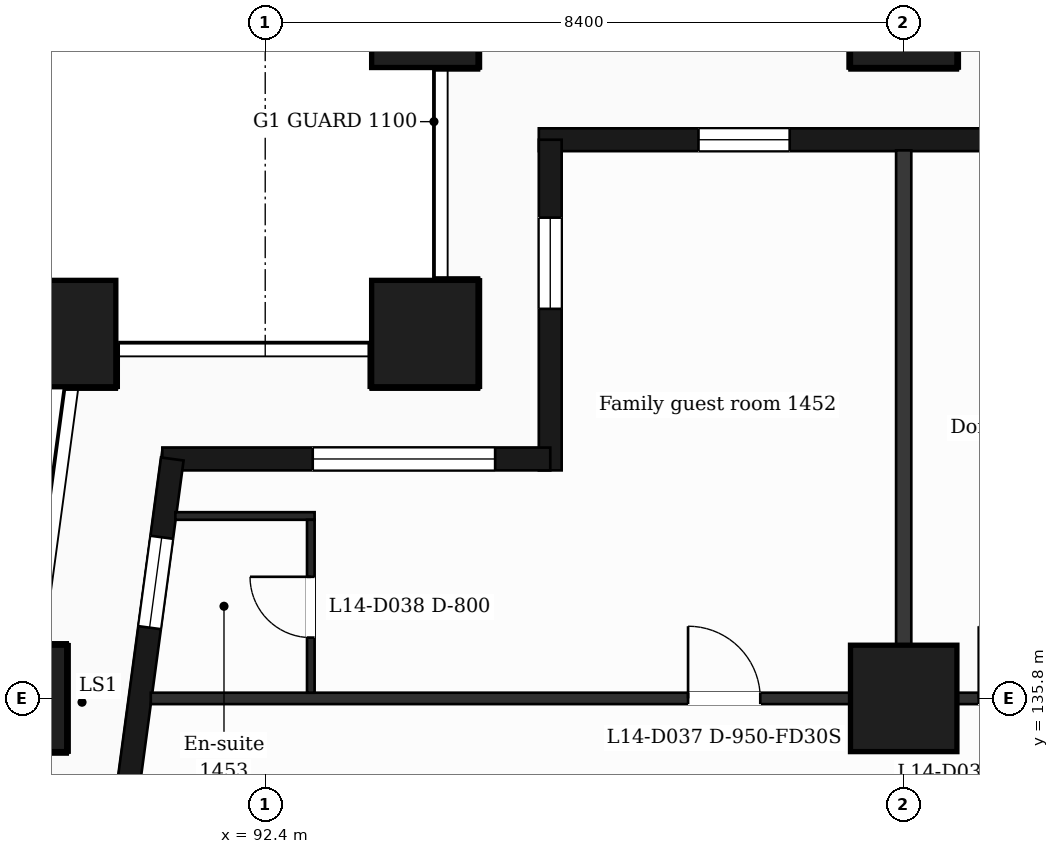
"""IFC4 building model, lengths in metres.
Left out: names, types, materials, properties, quantities, classifications, styles, units other than length and angle.
Written with IfcOpenShell. Run it as: python <this file> out.ifc"""

import sys

from ifc_helpers import new_model, si_unit, direction, frame, frame_2d, origin, origin_2d, place, context, subcontext, project, spatial, rectangle, extrude, element, fill, save


model = new_model("IFC4")
c1 = context("Model", 3, precision=1e-05, world=origin(), true_north=direction((0.0, 1.0)))
c2 = subcontext(c1, "Body", "Model", "MODEL_VIEW")
j1 = project(units=[si_unit("LENGTHUNIT", "METRE"), si_unit("PLANEANGLEUNIT", "RADIAN")], contexts=[c1])
p1 = place(None, origin())
s1 = spatial("IfcSite", under=j1, at=p1, CompositionType="ELEMENT")
p2 = place(p1, origin())
s2 = spatial("IfcBuilding", under=s1, at=p2, CompositionType="ELEMENT")
p3 = place(p2, frame((0.0, 0.0, 67.0)))
s3 = spatial("IfcBuildingStorey", under=s2, at=p3, CompositionType="ELEMENT", Elevation=67.0)
for number, where, z_axis, x_axis in (
    (1, (94.5, 140.6, 0.0), (0.0, 0.0, 1.0), (1.0, 0.0, 0.0)),
    (2, (89.735, 140.6, 0.0), (0.0, 0.0, 1.0), (1.0, 0.0, 0.0)),
    (3, (100.8, 135.8, 0.0), (0.0, 0.0, 1.0), (1.0, 0.0, 0.0)),
    (4, (89.088, 135.8, 0.0), (0.0, 0.0, 1.0), (1.0, 0.0, 0.0)),
    (5, (100.8, 144.8, 0.0), (0.0, 0.0, 1.0), (1.0, 0.0, 0.0)),
    (6, (94.5, 144.8, 0.0), (0.0, 0.0, 1.0), (1.0, 0.0, 0.0)),
):
    element("IfcColumn", number, at=place(p3, frame(where, z_axis=z_axis, x_axis=x_axis)), inside=s3, PredefinedType="COLUMN", context=c2, shape_type="SweptSolid", body=[
        extrude(rectangle(XDim=1.4, YDim=1.4, at=origin_2d()), origin(), (0.0, 0.0, 1.0), 3.5),
    ])
p4 = place(p3, frame((110.4, 143.15, 0.0), z_axis=(0.0, 0.0, 1.0), x_axis=(-1.0, 0.0, 0.0)))
e7 = element("IfcWall", 7, at=p4, inside=s3, PredefinedType="SOLIDWALL", context=c2, shape_type="SweptSolid", body=[
    extrude(rectangle(XDim=14.4, YDim=0.3, at=frame_2d((7.2, 0.0))), origin(), (0.0, 0.0, 1.0), 3.18),
])
p5 = place(p4, frame((2.1, 0.0, 0.9)))
e8 = element("IfcOpeningElement", 8, at=p5, cuts=e7, PredefinedType="OPENING", context=c2, shape_type="SweptSolid", body=[
    extrude(rectangle(XDim=2.4, YDim=2.1, at=frame_2d((1.2, 1.05))), frame((0.0, 0.16, 0.0), z_axis=(0.0, -1.0, 0.0), x_axis=(1.0, 0.0, 0.0)), (0.0, 0.0, 1.0), 0.32),
])
p6 = place(p4, frame((6.9, 0.0, 0.0)))
e9 = element("IfcOpeningElement", 9, at=p6, cuts=e7, PredefinedType="OPENING", context=c2, shape_type="SweptSolid", body=[
    extrude(rectangle(XDim=1.2, YDim=2.4, at=frame_2d((0.6, 1.2))), frame((0.0, 0.16, 0.0), z_axis=(0.0, -1.0, 0.0), x_axis=(1.0, 0.0, 0.0)), (0.0, 0.0, 1.0), 0.32),
])
p7 = place(p4, frame((11.1, 0.0, 0.9)))
e10 = element("IfcOpeningElement", 10, at=p7, cuts=e7, PredefinedType="OPENING", context=c2, shape_type="SweptSolid", body=[
    extrude(rectangle(XDim=1.2, YDim=2.1, at=frame_2d((0.6, 1.05))), frame((0.0, 0.16, 0.0), z_axis=(0.0, -1.0, 0.0), x_axis=(1.0, 0.0, 0.0)), (0.0, 0.0, 1.0), 0.32),
])
p8 = place(p3, frame((96.15, 143.15, 0.0), z_axis=(0.0, 0.0, 1.0), x_axis=(0.0, -1.0, 0.0)))
e11 = element("IfcWall", 11, at=p8, inside=s3, PredefinedType="SOLIDWALL", context=c2, shape_type="SweptSolid", body=[
    extrude(rectangle(XDim=4.35, YDim=0.3, at=frame_2d((2.175, 0.0))), origin(), (0.0, 0.0, 1.0), 3.18),
])
p9 = place(p8, frame((1.025, 0.0, 0.9)))
e12 = element("IfcOpeningElement", 12, at=p9, cuts=e11, PredefinedType="OPENING", context=c2, shape_type="SweptSolid", body=[
    extrude(rectangle(XDim=1.2, YDim=2.1, at=frame_2d((0.6, 1.05))), frame((0.0, 0.16, 0.0), z_axis=(0.0, -1.0, 0.0), x_axis=(1.0, 0.0, 0.0)), (0.0, 0.0, 1.0), 0.32),
])
p10 = place(p3, frame((96.15, 138.95, 0.0), z_axis=(0.0, 0.0, 1.0), x_axis=(-1.0, 0.0, 0.0)))
e13 = element("IfcWall", 13, at=p10, inside=s3, PredefinedType="SOLIDWALL", context=c2, shape_type="SweptSolid", body=[
    extrude(rectangle(XDim=5.104, YDim=0.3, at=frame_2d((2.552, 0.0))), origin(), (0.0, 0.0, 1.0), 3.18),
])
p11 = place(p10, frame((0.725, 0.0, 0.9)))
e14 = element("IfcOpeningElement", 14, at=p11, cuts=e13, PredefinedType="OPENING", context=c2, shape_type="SweptSolid", body=[
    extrude(rectangle(XDim=2.4, YDim=2.1, at=frame_2d((1.2, 1.05))), frame((0.0, 0.16, 0.0), z_axis=(0.0, -1.0, 0.0), x_axis=(1.0, 0.0, 0.0)), (0.0, 0.0, 1.0), 0.32),
])
p12 = place(p3, frame((91.177, 138.95, 0.0), z_axis=(0.0, 0.0, 1.0), x_axis=(-0.133426664613, -0.991058689065, 0.0)))
e15 = element("IfcWall", 15, at=p12, inside=s3, PredefinedType="SOLIDWALL", context=c2, shape_type="SweptSolid", body=[
    extrude(rectangle(XDim=6.609, YDim=0.3, at=frame_2d((3.305, 0.0))), origin(), (0.0, 0.0, 1.0), 3.18),
])
p13 = place(p12, frame((1.039, 0.0, 0.9)))
e16 = element("IfcOpeningElement", 16, at=p13, cuts=e15, PredefinedType="OPENING", context=c2, shape_type="SweptSolid", body=[
    extrude(rectangle(XDim=1.2, YDim=2.1, at=frame_2d((0.6, 1.05))), frame((0.0, 0.16, 0.0), z_axis=(0.0, -1.0, 0.0), x_axis=(1.0, 0.0, 0.0)), (0.0, 0.0, 1.0), 0.32),
])
p14 = place(p12, frame((4.294, 0.0, 0.0)))
e17 = element("IfcOpeningElement", 17, at=p14, cuts=e15, PredefinedType="OPENING", context=c2, shape_type="SweptSolid", body=[
    extrude(rectangle(XDim=1.2, YDim=2.4, at=frame_2d((0.6, 1.2))), frame((0.0, 0.16, 0.0), z_axis=(0.0, -1.0, 0.0), x_axis=(1.0, 0.0, 0.0)), (0.0, 0.0, 1.0), 0.32),
])
p15 = place(p3, frame((90.895, 135.8, 0.0), z_axis=(0.0, 0.0, 1.0), x_axis=(1.0, 0.0, 0.0)))
e18 = element("IfcWall", 18, at=p15, inside=s3, PredefinedType="PARTITIONING", context=c2, shape_type="SweptSolid", body=[
    extrude(rectangle(XDim=45.011, YDim=0.15, at=frame_2d((22.505, 0.0))), origin(), (0.0, 0.0, 1.0), 3.18),
])
p16 = place(p15, frame((7.068, 0.0, 0.0)))
e19 = element("IfcOpeningElement", 19, at=p16, cuts=e18, PredefinedType="OPENING", context=c2, shape_type="SweptSolid", body=[
    extrude(rectangle(XDim=0.95, YDim=2.1, at=frame_2d((0.475, 1.05))), frame((0.0, 0.085, 0.0), z_axis=(0.0, -1.0, 0.0), x_axis=(1.0, 0.0, 0.0)), (0.0, 0.0, 1.0), 0.17),
])
p17 = place(p15, frame((10.892, 0.0, 0.0)))
e20 = element("IfcOpeningElement", 20, at=p17, cuts=e18, PredefinedType="OPENING", context=c2, shape_type="SweptSolid", body=[
    extrude(rectangle(XDim=0.95, YDim=2.1, at=frame_2d((0.475, 1.05))), frame((0.0, 0.085, 0.0), z_axis=(0.0, -1.0, 0.0), x_axis=(1.0, 0.0, 0.0)), (0.0, 0.0, 1.0), 0.17),
])
p18 = place(p15, frame((16.455, 0.0, 0.0)))
e21 = element("IfcOpeningElement", 21, at=p18, cuts=e18, PredefinedType="OPENING", context=c2, shape_type="SweptSolid", body=[
    extrude(rectangle(XDim=0.95, YDim=2.1, at=frame_2d((0.475, 1.05))), frame((0.0, 0.085, 0.0), z_axis=(0.0, -1.0, 0.0), x_axis=(1.0, 0.0, 0.0)), (0.0, 0.0, 1.0), 0.17),
])
p19 = place(p15, frame((21.918, 0.0, 0.0)))
e22 = element("IfcOpeningElement", 22, at=p19, cuts=e18, PredefinedType="OPENING", context=c2, shape_type="SweptSolid", body=[
    extrude(rectangle(XDim=0.95, YDim=2.1, at=frame_2d((0.475, 1.05))), frame((0.0, 0.085, 0.0), z_axis=(0.0, -1.0, 0.0), x_axis=(1.0, 0.0, 0.0)), (0.0, 0.0, 1.0), 0.17),
])
p20 = place(p15, frame((28.969, 0.0, 0.0)))
e23 = element("IfcOpeningElement", 23, at=p20, cuts=e18, PredefinedType="OPENING", context=c2, shape_type="SweptSolid", body=[
    extrude(rectangle(XDim=0.95, YDim=2.1, at=frame_2d((0.475, 1.05))), frame((0.0, 0.085, 0.0), z_axis=(0.0, -1.0, 0.0), x_axis=(1.0, 0.0, 0.0)), (0.0, 0.0, 1.0), 0.17),
])
p21 = place(p15, frame((32.531, 0.0, 0.0)))
e24 = element("IfcOpeningElement", 24, at=p21, cuts=e18, PredefinedType="OPENING", context=c2, shape_type="SweptSolid", body=[
    extrude(rectangle(XDim=0.95, YDim=2.1, at=frame_2d((0.475, 1.05))), frame((0.0, 0.085, 0.0), z_axis=(0.0, -1.0, 0.0), x_axis=(1.0, 0.0, 0.0)), (0.0, 0.0, 1.0), 0.17),
])
p22 = place(p15, frame((40.929, 0.0, 0.0)))
e25 = element("IfcOpeningElement", 25, at=p22, cuts=e18, PredefinedType="OPENING", context=c2, shape_type="SweptSolid", body=[
    extrude(rectangle(XDim=0.95, YDim=2.1, at=frame_2d((0.475, 1.05))), frame((0.0, 0.085, 0.0), z_axis=(0.0, -1.0, 0.0), x_axis=(1.0, 0.0, 0.0)), (0.0, 0.0, 1.0), 0.17),
])
p23 = place(p3, frame((91.218, 138.2, 0.0), z_axis=(0.0, 0.0, 1.0), x_axis=(1.0, 0.0, 0.0)))
e26 = element("IfcWall", 26, at=p23, inside=s3, PredefinedType="PARTITIONING", context=c2, shape_type="SweptSolid", body=[
    extrude(rectangle(XDim=1.832, YDim=0.1, at=frame_2d((0.916, 0.0))), origin(), (0.0, 0.0, 1.0), 3.18),
])
p24 = place(p3, frame((93.0, 135.875, 0.0), z_axis=(0.0, 0.0, 1.0), x_axis=(0.0, 1.0, 0.0)))
e27 = element("IfcWall", 27, at=p24, inside=s3, PredefinedType="PARTITIONING", context=c2, shape_type="SweptSolid", body=[
    extrude(rectangle(XDim=2.275, YDim=0.1, at=frame_2d((1.137, 0.0))), origin(), (0.0, 0.0, 1.0), 3.18),
])
p25 = place(p24, frame((0.725, 0.0, 0.0)))
e28 = element("IfcOpeningElement", 28, at=p25, cuts=e27, PredefinedType="OPENING", context=c2, shape_type="SweptSolid", body=[
    extrude(rectangle(XDim=0.8, YDim=2.1, at=frame_2d((0.4, 1.05))), frame((0.0, 0.06, 0.0), z_axis=(0.0, -1.0, 0.0), x_axis=(1.0, 0.0, 0.0)), (0.0, 0.0, 1.0), 0.12),
])
p26 = place(p3, frame((100.8, 135.875, 0.0), z_axis=(0.0, 0.0, 1.0), x_axis=(0.0, 1.0, 0.0)))
e29 = element("IfcWall", 29, at=p26, inside=s3, PredefinedType="PARTITIONING", context=c2, shape_type="SweptSolid", body=[
    extrude(rectangle(XDim=7.135, YDim=0.2, at=frame_2d((3.567, 0.0))), origin(), (0.0, 0.0, 1.0), 3.18),
])
p27 = place(p7, origin())
e30 = element("IfcWindow", 30, at=p27, inside=s3, PartitioningType="SINGLE_PANEL", PredefinedType="WINDOW", context=c2, shape_type="SweptSolid", body=[
    extrude(rectangle(XDim=1.2, YDim=2.1, at=frame_2d((0.6, 1.05))), frame((0.0, 0.03, 0.0), z_axis=(0.0, -1.0, 0.0), x_axis=(1.0, 0.0, 0.0)), (0.0, 0.0, 1.0), 0.06),
])
fill(e10, e30)
p28 = place(p9, origin())
e31 = element("IfcWindow", 31, at=p28, inside=s3, PartitioningType="SINGLE_PANEL", PredefinedType="WINDOW", context=c2, shape_type="SweptSolid", body=[
    extrude(rectangle(XDim=1.2, YDim=2.1, at=frame_2d((0.6, 1.05))), frame((0.0, 0.03, 0.0), z_axis=(0.0, -1.0, 0.0), x_axis=(1.0, 0.0, 0.0)), (0.0, 0.0, 1.0), 0.06),
])
fill(e12, e31)
p29 = place(p11, origin())
e32 = element("IfcWindow", 32, at=p29, inside=s3, PartitioningType="SINGLE_PANEL", PredefinedType="WINDOW", context=c2, shape_type="SweptSolid", body=[
    extrude(rectangle(XDim=2.4, YDim=2.1, at=frame_2d((1.2, 1.05))), frame((0.0, 0.03, 0.0), z_axis=(0.0, -1.0, 0.0), x_axis=(1.0, 0.0, 0.0)), (0.0, 0.0, 1.0), 0.06),
])
fill(e14, e32)
p30 = place(p13, origin())
e33 = element("IfcWindow", 33, at=p30, inside=s3, PartitioningType="SINGLE_PANEL", PredefinedType="WINDOW", context=c2, shape_type="SweptSolid", body=[
    extrude(rectangle(XDim=1.2, YDim=2.1, at=frame_2d((0.6, 1.05))), frame((0.0, 0.03, 0.0), z_axis=(0.0, -1.0, 0.0), x_axis=(1.0, 0.0, 0.0)), (0.0, 0.0, 1.0), 0.06),
])
fill(e16, e33)
p31 = place(p16, origin())
e34 = element("IfcDoor", 34, at=p31, inside=s3, OperationType="SINGLE_SWING_LEFT", PredefinedType="DOOR", context=c2, shape_type="SweptSolid", body=[
    extrude(rectangle(XDim=0.95, YDim=2.1, at=frame_2d((0.475, 1.05))), frame((0.0, 0.025, 0.0), z_axis=(0.0, -1.0, 0.0), x_axis=(1.0, 0.0, 0.0)), (0.0, 0.0, 1.0), 0.05),
])
fill(e19, e34)
p32 = place(p25, origin())
e35 = element("IfcDoor", 35, at=p32, inside=s3, OperationType="SINGLE_SWING_RIGHT", PredefinedType="DOOR", context=c2, shape_type="SweptSolid", body=[
    extrude(rectangle(XDim=0.8, YDim=2.1, at=frame_2d((0.4, 1.05))), frame((0.0, 0.025, 0.0), z_axis=(0.0, -1.0, 0.0), x_axis=(1.0, 0.0, 0.0)), (0.0, 0.0, 1.0), 0.05),
])
fill(e28, e35)
p33 = place(p17, origin())
e36 = element("IfcDoor", 36, at=p33, inside=s3, OperationType="SINGLE_SWING_LEFT", PredefinedType="DOOR", context=c2, shape_type="SweptSolid", body=[
    extrude(rectangle(XDim=0.95, YDim=2.1, at=frame_2d((0.475, 1.05))), frame((0.0, 0.025, 0.0), z_axis=(0.0, -1.0, 0.0), x_axis=(1.0, 0.0, 0.0)), (0.0, 0.0, 1.0), 0.05),
])
fill(e20, e36)
save(model, sys.argv[1])
